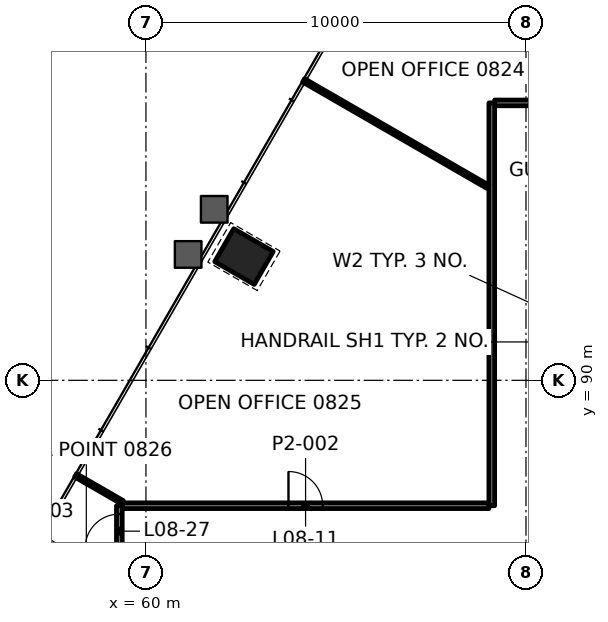
"""IFC4 building model, lengths in metres.
Left out: names, types, materials, properties, quantities, classifications, styles, units other than length and angle.
Written with IfcOpenShell. Run it as: python <this file> out.ifc"""

import sys

from ifc_helpers import new_model, si_unit, direction, frame, frame_2d, origin, origin_2d, place, context, subcontext, project, spatial, rectangle, extrude, element, fill, save


model = new_model("IFC4")
c1 = context("Model", 3, precision=1e-05, world=origin(), true_north=direction((0.0, 1.0)))
c2 = subcontext(c1, "Body", "Model", "MODEL_VIEW")
j1 = project(units=[si_unit("LENGTHUNIT", "METRE"), si_unit("PLANEANGLEUNIT", "RADIAN")], contexts=[c1])
p1 = place(None, origin())
s1 = spatial("IfcSite", under=j1, at=p1, CompositionType="ELEMENT")
p2 = place(p1, origin())
s2 = spatial("IfcBuilding", under=s1, at=p2, CompositionType="ELEMENT")
p3 = place(p2, frame((0.0, 0.0, 40.0)))
s3 = spatial("IfcBuildingStorey", under=s2, at=p3, CompositionType="ELEMENT", Elevation=40.0)
p4 = place(p3, frame((62.579, 93.256, -0.0), z_axis=(0.0, 0.0, 1.0), x_axis=(-0.5, -0.866025403784, 0.0)))
e1 = element("IfcColumn", 1, at=p4, inside=s3, PredefinedType="COLUMN", context=c2, shape_type="SweptSolid", body=[
    extrude(rectangle(XDim=1.0, YDim=1.2, at=origin_2d()), origin(), (0.0, 0.0, 1.0), 4.2),
])
p5 = place(p3, frame((59.375, 86.7, 0.0), z_axis=(0.0, 0.0, 1.0), x_axis=(1.0, 0.0, 0.0)))
e2 = element("IfcWall", 2, at=p5, inside=s3, PredefinedType="PARTITIONING", context=c2, shape_type="SweptSolid", body=[
    extrude(rectangle(XDim=9.649, YDim=0.15, at=frame_2d((4.825, 0.0))), origin(), (0.0, 0.0, 1.0), 3.4),
])
p6 = place(p5, frame((4.375, 0.0, 0.0)))
e3 = element("IfcOpeningElement", 3, at=p6, cuts=e2, PredefinedType="OPENING", context=c2, shape_type="SweptSolid", body=[
    extrude(rectangle(XDim=0.9, YDim=2.1, at=frame_2d((0.45, 1.05))), frame((0.0, 0.085, 0.0), z_axis=(0.0, -1.0, 0.0), x_axis=(1.0, 0.0, 0.0)), (0.0, 0.0, 1.0), 0.17),
])
p7 = place(p3, frame((69.176, 97.3, 0.0), z_axis=(0.0, 0.0, 1.0), x_axis=(1.0, 0.0, 0.0)))
e4 = element("IfcWall", 4, at=p7, inside=s3, PredefinedType="PARTITIONING", context=c2, shape_type="SweptSolid", body=[
    extrude(rectangle(XDim=4.849, YDim=0.15, at=frame_2d((2.425, 0.0))), origin(), (0.0, 0.0, 1.0), 3.4),
])
p8 = place(p7, frame((1.975, 0.0, 0.0)))
e5 = element("IfcOpeningElement", 5, at=p8, cuts=e4, PredefinedType="OPENING", context=c2, shape_type="SweptSolid", body=[
    extrude(rectangle(XDim=0.9, YDim=2.1, at=frame_2d((0.45, 1.05))), frame((0.0, 0.085, 0.0), z_axis=(0.0, -1.0, 0.0), x_axis=(1.0, 0.0, 0.0)), (0.0, 0.0, 1.0), 0.17),
])
p9 = place(p3, frame((69.1, 86.7, 0.0), z_axis=(0.0, 0.0, 1.0), x_axis=(0.0, 1.0, 0.0)))
e6 = element("IfcWall", 6, at=p9, inside=s3, PredefinedType="PARTITIONING", context=c2, shape_type="SweptSolid", body=[
    extrude(rectangle(XDim=10.6, YDim=0.15, at=frame_2d((5.3, 0.0))), origin(), (0.0, 0.0, 1.0), 3.4),
])
p10 = place(p3, frame((59.3, 66.975, 0.0), z_axis=(0.0, 0.0, 1.0), x_axis=(0.0, 1.0, 0.0)))
e7 = element("IfcWall", 7, at=p10, inside=s3, PredefinedType="PARTITIONING", context=c2, shape_type="SweptSolid", body=[
    extrude(rectangle(XDim=19.725, YDim=0.15, at=frame_2d((9.862, 0.0))), origin(), (0.0, 0.0, 1.0), 3.4),
])
p11 = place(p10, frame((12.483, 0.0, 0.0)))
e8 = element("IfcOpeningElement", 8, at=p11, cuts=e7, PredefinedType="OPENING", context=c2, shape_type="SweptSolid", body=[
    extrude(rectangle(XDim=0.9, YDim=2.1, at=frame_2d((0.45, 1.05))), frame((0.0, 0.085, 0.0), z_axis=(0.0, -1.0, 0.0), x_axis=(1.0, 0.0, 0.0)), (0.0, 0.0, 1.0), 0.17),
])
p12 = place(p10, frame((15.254, 0.0, 0.0)))
e9 = element("IfcOpeningElement", 9, at=p12, cuts=e7, PredefinedType="OPENING", context=c2, shape_type="SweptSolid", body=[
    extrude(rectangle(XDim=0.9, YDim=2.1, at=frame_2d((0.45, 1.05))), frame((0.0, 0.085, 0.0), z_axis=(0.0, -1.0, 0.0), x_axis=(1.0, 0.0, 0.0)), (0.0, 0.0, 1.0), 0.17),
])
p13 = place(p10, frame((18.606, 0.0, 0.0)))
e10 = element("IfcOpeningElement", 10, at=p13, cuts=e7, PredefinedType="OPENING", context=c2, shape_type="SweptSolid", body=[
    extrude(rectangle(XDim=0.9, YDim=2.1, at=frame_2d((0.45, 1.05))), frame((0.0, 0.085, 0.0), z_axis=(0.0, -1.0, 0.0), x_axis=(1.0, 0.0, 0.0)), (0.0, 0.0, 1.0), 0.17),
])
p14 = place(p3, frame((68.999, 95.093, 0.0), z_axis=(0.0, 0.0, 1.0), x_axis=(-0.866032434152, 0.499987822848, 0.0)))
e11 = element("IfcWall", 11, at=p14, inside=s3, PredefinedType="PARTITIONING", context=c2, shape_type="SweptSolid", body=[
    extrude(rectangle(XDim=5.601, YDim=0.1, at=frame_2d((2.801, 0.0))), origin(), (0.0, 0.0, 1.0), 3.165),
])
p15 = place(p3, frame((59.379, 86.79, 0.0), z_axis=(0.0, 0.0, 1.0), x_axis=(-0.866025408043, 0.499999992624, 0.0)))
e12 = element("IfcWall", 12, at=p15, inside=s3, PredefinedType="PARTITIONING", context=c2, shape_type="SweptSolid", body=[
    extrude(rectangle(XDim=1.421, YDim=0.1, at=frame_2d((0.711, 0.0))), origin(), (0.0, 0.0, 1.0), 3.165),
])
p16 = place(p6, origin())
e13 = element("IfcDoor", 13, at=p16, inside=s3, OperationType="SINGLE_SWING_RIGHT", PredefinedType="DOOR", context=c2, shape_type="SweptSolid", body=[
    extrude(rectangle(XDim=0.9, YDim=2.1, at=frame_2d((0.45, 1.05))), frame((0.0, 0.025, 0.0), z_axis=(0.0, -1.0, 0.0), x_axis=(1.0, 0.0, 0.0)), (0.0, 0.0, 1.0), 0.05),
])
fill(e3, e13)
p17 = place(p13, origin())
e14 = element("IfcDoor", 14, at=p17, inside=s3, OperationType="SINGLE_SWING_LEFT", PredefinedType="DOOR", context=c2, shape_type="SweptSolid", body=[
    extrude(rectangle(XDim=0.9, YDim=2.1, at=frame_2d((0.45, 1.05))), frame((0.0, 0.025, 0.0), z_axis=(0.0, -1.0, 0.0), x_axis=(1.0, 0.0, 0.0)), (0.0, 0.0, 1.0), 0.05),
])
fill(e10, e14)
save(model, sys.argv[1])
